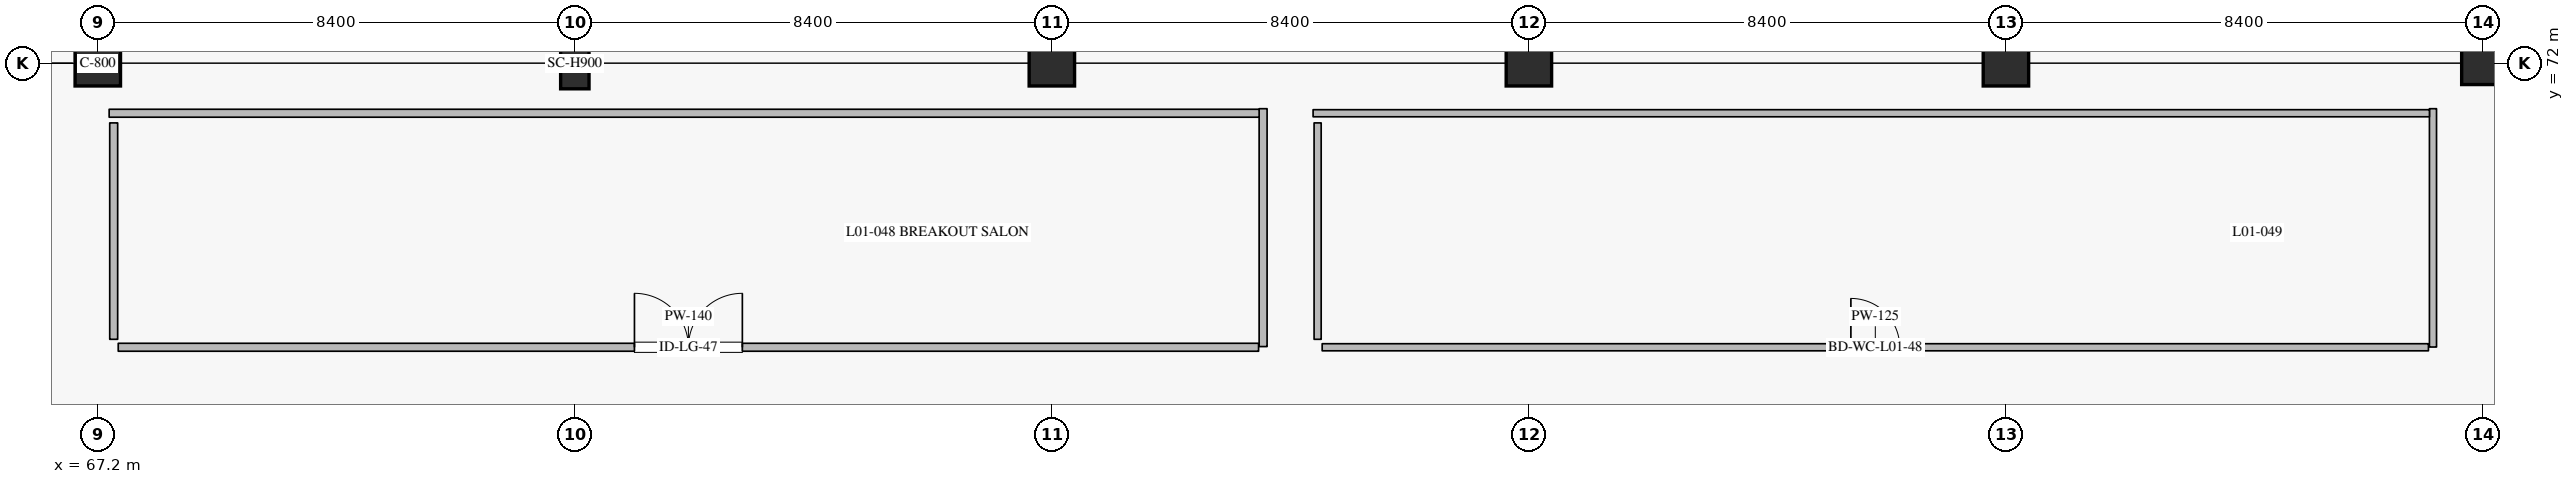
"""IFC4 building model, lengths in metres.
Left out: names, types, materials, properties, quantities, classifications, styles, units other than length and angle.
Written with IfcOpenShell. Run it as: python <this file> out.ifc"""

import sys

from ifc_helpers import new_model, si_unit, direction, frame, frame_2d, origin, origin_2d, place, context, subcontext, project, spatial, rectangle, hollow_rectangle, extrude, element, fill, save


model = new_model("IFC4")
c1 = context("Model", 3, precision=1e-05, world=origin(), true_north=direction((0.0, 1.0)))
c2 = subcontext(c1, "Body", "Model", "MODEL_VIEW")
j1 = project(units=[si_unit("LENGTHUNIT", "METRE"), si_unit("PLANEANGLEUNIT", "RADIAN")], contexts=[c1])
p1 = place(None, origin())
s1 = spatial("IfcSite", under=j1, at=p1, CompositionType="ELEMENT")
p2 = place(p1, origin())
s2 = spatial("IfcBuilding", under=s1, at=p2, CompositionType="ELEMENT")
p3 = place(p2, frame((0.0, 0.0, 6.0)))
s3 = spatial("IfcBuildingStorey", under=s2, at=p3, CompositionType="ELEMENT", Elevation=6.0)
p4 = place(p3, frame((67.2, 72.0, 0.0), z_axis=(0.0, 0.0, 1.0), x_axis=(1.0, 0.0, 0.0)))
e1 = element("IfcColumn", 1, at=p4, inside=s3, PredefinedType="COLUMN", context=c2, shape_type="SweptSolid", body=[
    extrude(rectangle(XDim=0.8, YDim=0.8, at=origin_2d()), origin(), (0.0, 0.0, 1.0), 5.4),
])
p5 = place(p3, frame((75.6, 72.0, 0.0), z_axis=(0.0, 0.0, 1.0), x_axis=(1.0, 0.0, 0.0)))
e2 = element("IfcColumn", 2, at=p5, inside=s3, PredefinedType="COLUMN", context=c2, shape_type="SweptSolid", body=[
    extrude(hollow_rectangle(XDim=0.5, YDim=0.9, WallThickness=0.024, at=origin_2d()), origin(), (0.0, 0.0, 1.0), 5.4),
])
for number, where, z_axis, x_axis in (
    (3, (84.0, 72.0, 0.0), (0.0, 0.0, 1.0), (1.0, 0.0, 0.0)),
    (4, (92.4, 72.0, 0.0), (0.0, 0.0, 1.0), (1.0, 0.0, 0.0)),
    (5, (100.8, 72.0, 0.0), (0.0, 0.0, 1.0), (1.0, 0.0, 0.0)),
):
    element("IfcColumn", number, at=place(p3, frame(where, z_axis=z_axis, x_axis=x_axis)), inside=s3, PredefinedType="COLUMN", context=c2, shape_type="SweptSolid", body=[
        extrude(rectangle(XDim=0.8, YDim=0.8, at=origin_2d()), origin(), (0.0, 0.0, 1.0), 5.4),
    ])
p6 = place(p3, frame((109.2, 72.0, 0.0), z_axis=(0.0, 0.0, 1.0), x_axis=(1.0, 0.0, 0.0)))
e6 = element("IfcColumn", 6, at=p6, inside=s3, PredefinedType="COLUMN", context=c2, shape_type="SweptSolid", body=[
    extrude(rectangle(XDim=0.75, YDim=0.75, at=origin_2d()), origin(), (0.0, 0.0, 1.0), 5.4),
])
p7 = place(p3, frame((67.56, 67.0, 0.0), z_axis=(0.0, 0.0, 1.0), x_axis=(1.0, 0.0, 0.0)))
e7 = element("IfcWall", 7, at=p7, inside=s3, PredefinedType="PARTITIONING", context=c2, shape_type="SweptSolid", body=[
    extrude(rectangle(XDim=20.08, YDim=0.14, at=frame_2d((10.04, 0.0))), origin(), (0.0, 0.0, 1.0), 5.045),
])
p8 = place(p7, frame((9.09, 0.0, 0.0)))
e8 = element("IfcOpeningElement", 8, at=p8, cuts=e7, PredefinedType="OPENING", context=c2, shape_type="SweptSolid", body=[
    extrude(rectangle(XDim=1.9, YDim=2.4, at=frame_2d((0.95, 1.2))), frame((0.0, 0.08, 0.0), z_axis=(0.0, -1.0, 0.0), x_axis=(1.0, 0.0, 0.0)), (0.0, 0.0, 1.0), 0.16),
])
p9 = place(p3, frame((67.48, 67.14, 0.0), z_axis=(0.0, 0.0, 1.0), x_axis=(0.0, 1.0, 0.0)))
e9 = element("IfcWall", 9, at=p9, inside=s3, PredefinedType="PARTITIONING", context=c2, shape_type="SweptSolid", body=[
    extrude(rectangle(XDim=3.81, YDim=0.14, at=frame_2d((1.905, 0.0))), origin(), (0.0, 0.0, 1.0), 5.045),
])
p10 = place(p3, frame((88.76, 67.0, 0.0), z_axis=(0.0, 0.0, 1.0), x_axis=(1.0, 0.0, 0.0)))
e10 = element("IfcWall", 10, at=p10, inside=s3, PredefinedType="PARTITIONING", context=c2, shape_type="SweptSolid", body=[
    extrude(rectangle(XDim=19.48, YDim=0.125, at=frame_2d((9.74, 0.0))), origin(), (0.0, 0.0, 1.0), 5.045),
])
p11 = place(p10, frame((9.31, 0.0, 0.0)))
e11 = element("IfcOpeningElement", 11, at=p11, cuts=e10, PredefinedType="OPENING", context=c2, shape_type="SweptSolid", body=[
    extrude(rectangle(XDim=0.86, YDim=2.12, at=frame_2d((0.43, 1.06))), frame((0.0, 0.073, 0.0), z_axis=(0.0, -1.0, 0.0), x_axis=(1.0, 0.0, 0.0)), (0.0, 0.0, 1.0), 0.145),
])
p12 = place(p3, frame((88.68, 67.14, 0.0), z_axis=(0.0, 0.0, 1.0), x_axis=(0.0, 1.0, 0.0)))
e12 = element("IfcWall", 12, at=p12, inside=s3, PredefinedType="PARTITIONING", context=c2, shape_type="SweptSolid", body=[
    extrude(rectangle(XDim=3.81, YDim=0.125, at=frame_2d((1.905, 0.0))), origin(), (0.0, 0.0, 1.0), 5.045),
])
p13 = place(p3, frame((87.72, 67.012, 0.0), z_axis=(0.0, 0.0, 1.0), x_axis=(0.0, 1.0, 0.0)))
e13 = element("IfcWall", 13, at=p13, inside=s3, PredefinedType="PARTITIONING", context=c2, shape_type="SweptSolid", body=[
    extrude(rectangle(XDim=4.188, YDim=0.14, at=frame_2d((2.094, 0.0))), origin(), (0.0, 0.0, 1.0), 5.045),
])
p14 = place(p3, frame((67.4, 71.12, 0.0), z_axis=(0.0, 0.0, 1.0), x_axis=(1.0, 0.0, 0.0)))
e14 = element("IfcWall", 14, at=p14, inside=s3, PredefinedType="PARTITIONING", context=c2, shape_type="SweptSolid", body=[
    extrude(rectangle(XDim=20.25, YDim=0.14, at=frame_2d((10.125, 0.0))), origin(), (0.0, 0.0, 1.0), 5.045),
])
p15 = place(p3, frame((108.32, 67.004, 0.0), z_axis=(0.0, 0.0, 1.0), x_axis=(0.0, 1.0, 0.0)))
e15 = element("IfcWall", 15, at=p15, inside=s3, PredefinedType="PARTITIONING", context=c2, shape_type="SweptSolid", body=[
    extrude(rectangle(XDim=4.196, YDim=0.125, at=frame_2d((2.098, 0.0))), origin(), (0.0, 0.0, 1.0), 5.045),
])
p16 = place(p3, frame((88.6, 71.12, 0.0), z_axis=(0.0, 0.0, 1.0), x_axis=(1.0, 0.0, 0.0)))
e16 = element("IfcWall", 16, at=p16, inside=s3, PredefinedType="PARTITIONING", context=c2, shape_type="SweptSolid", body=[
    extrude(rectangle(XDim=19.658, YDim=0.125, at=frame_2d((9.829, 0.0))), origin(), (0.0, 0.0, 1.0), 5.045),
])
p17 = place(p8, origin())
e17 = element("IfcDoor", 17, at=p17, inside=s3, OperationType="DOUBLE_DOOR_SINGLE_SWING", PredefinedType="DOOR", context=c2, shape_type="SweptSolid", body=[
    extrude(rectangle(XDim=1.9, YDim=2.4, at=frame_2d((0.95, 1.2))), frame((0.0, 0.025, 0.0), z_axis=(0.0, -1.0, 0.0), x_axis=(1.0, 0.0, 0.0)), (0.0, 0.0, 1.0), 0.05),
])
fill(e8, e17)
p18 = place(p11, origin())
e18 = element("IfcDoor", 18, at=p18, inside=s3, OperationType="SINGLE_SWING_LEFT", PredefinedType="DOOR", context=c2, shape_type="SweptSolid", body=[
    extrude(rectangle(XDim=0.86, YDim=2.12, at=frame_2d((0.43, 1.06))), frame((0.0, 0.025, 0.0), z_axis=(0.0, -1.0, 0.0), x_axis=(1.0, 0.0, 0.0)), (0.0, 0.0, 1.0), 0.05),
])
fill(e11, e18)
save(model, sys.argv[1])
